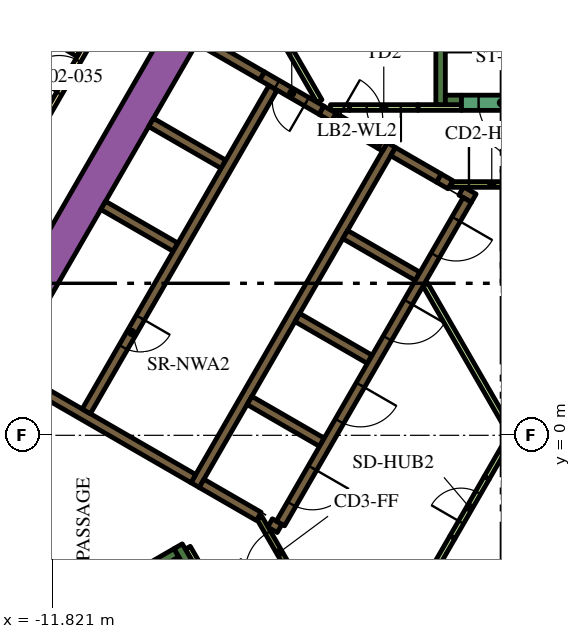
"""IFC4 building model, lengths in metres.
Left out: names, types, materials, properties, quantities, classifications, styles, units other than length and angle.
Written with IfcOpenShell. Run it as: python <this file> out.ifc"""

import sys

from ifc_helpers import new_model, si_unit, direction, frame, frame_2d, origin, place, context, subcontext, project, spatial, polyline, rectangle, outline, extrude, element, fill, save


model = new_model("IFC4")
c1 = context("Model", 3, precision=1e-05, world=origin(), true_north=direction((0.0, 1.0)))
c2 = subcontext(c1, "Body", "Model", "MODEL_VIEW")
j1 = project(units=[si_unit("LENGTHUNIT", "METRE"), si_unit("PLANEANGLEUNIT", "RADIAN")], contexts=[c1])
p1 = place(None, origin())
s1 = spatial("IfcSite", under=j1, at=p1, CompositionType="ELEMENT")
p2 = place(p1, origin())
s2 = spatial("IfcBuilding", under=s1, at=p2, CompositionType="ELEMENT")
p3 = place(p2, frame((0.0, 0.0, 47.1)))
s3 = spatial("IfcBuildingStorey", under=s2, at=p3, CompositionType="ELEMENT", Elevation=47.1)
p4 = place(p3, frame((-15.36, -1.503, 0.0), z_axis=(0.0, 0.0, 1.0), x_axis=(0.50000389221, 0.866023156604, 0.0)))
e1 = element("IfcWall", 1, at=p4, inside=s3, PredefinedType="SOLIDWALL", context=c2, shape_type="SweptSolid", body=[
    extrude(rectangle(XDim=21.0, YDim=0.9, at=frame_2d((10.5, 0.0))), origin(), (0.0, 0.0, 1.0), 3.9),
])
p5 = place(p3, frame((-1.6, 8.7, 0.0), z_axis=(0.0, 0.0, 1.0), x_axis=(0.0, 1.0, 0.0)))
e2 = element("IfcWall", 2, at=p5, inside=s3, PredefinedType="SOLIDWALL", context=c2, shape_type="SweptSolid", body=[
    extrude(rectangle(XDim=7.05, YDim=0.25, at=frame_2d((3.525, 0.0))), origin(), (0.0, 0.0, 1.0), 3.9),
])
p6 = place(p3, frame((-1.475, 8.825, 0.0), z_axis=(0.0, 0.0, 1.0), x_axis=(1.0, 0.0, 0.0)))
e3 = element("IfcWall", 3, at=p6, inside=s3, PredefinedType="SOLIDWALL", context=c2, shape_type="SweptSolid", body=[
    extrude(rectangle(XDim=0.425, YDim=0.25, at=frame_2d((0.212, 0.0))), origin(), (0.0, 0.0, 1.0), 3.9),
])
p7 = place(p3, frame((-14.44, -6.49, 0.0), z_axis=(0.0, 0.0, 1.0), x_axis=(0.866022966069, 0.500004222222, 0.0)))
e4 = element("IfcWall", 4, at=p7, inside=s3, PredefinedType="SOLIDWALL", context=c2, shape_type="SweptSolid", body=[
    extrude(rectangle(XDim=6.8, YDim=0.25, at=frame_2d((3.4, 0.0))), origin(), (0.0, 0.0, 1.0), 3.9),
])
p8 = place(p3, frame((-8.168, -3.503, 0.0), z_axis=(0.0, 0.0, 1.0), x_axis=(-0.499952099219, 0.866053057547, 0.0)))
e5 = element("IfcWall", 5, at=p8, inside=s3, PredefinedType="SOLIDWALL", context=c2, shape_type="SweptSolid", body=[
    extrude(rectangle(XDim=0.675, YDim=0.25, at=frame_2d((0.337, 0.0))), origin(), (0.0, 0.0, 1.0), 3.9),
])
p9 = place(p3, frame((-8.06, -1.311, 0.0), z_axis=(0.0, 0.0, 1.0), x_axis=(0.50000273126, 0.866023826885, 0.0)))
e6 = element("IfcWall", 6, at=p9, inside=s3, PredefinedType="SOLIDWALL", context=c2, shape_type="SweptSolid", body=[
    extrude(rectangle(XDim=10.33, YDim=0.25, at=frame_2d((5.165, 0.0))), origin(), (0.0, 0.0, 1.0), 3.9),
])
p10 = place(p3, frame((-1.342, 6.595, 0.0), z_axis=(0.0, 0.0, 1.0), x_axis=(-0.866046247233, 0.49996389635, 0.0)))
e7 = element("IfcWall", 7, at=p10, inside=s3, PredefinedType="SOLIDWALL", context=c2, shape_type="SweptSolid", body=[
    extrude(rectangle(XDim=0.35, YDim=0.25, at=frame_2d((0.175, 0.0))), origin(), (0.0, 0.0, 1.0), 3.9),
])
p11 = place(p3, frame((-1.647, 6.771, 0.0), z_axis=(0.0, 0.0, 1.0), x_axis=(-0.865971728693, 0.500092956464, 0.0)))
e8 = element("IfcWall", 8, at=p11, inside=s3, PredefinedType="SOLIDWALL", context=c2, shape_type="SweptSolid", body=[
    extrude(rectangle(XDim=1.388, YDim=0.25, at=frame_2d((0.694, 0.0))), origin(), (0.0, 0.0, 1.0), 3.9),
])
p12 = place(p3, frame((-0.728, 6.24, 0.0), z_axis=(0.0, 0.0, 1.0), x_axis=(-0.866088799389, 0.499890179513, 0.0)))
e9 = element("IfcWall", 9, at=p12, inside=s3, PredefinedType="SOLIDWALL", context=c2, shape_type="SweptSolid", body=[
    extrude(rectangle(XDim=0.378, YDim=0.25, at=frame_2d((0.189, 0.0))), origin(), (0.0, 0.0, 1.0), 3.9),
])
for number, where, z_axis, x_axis in (
    (10, (-2.204, 4.182, 0.0), (0.0, 0.0, 1.0), (-0.866, 0.5, 0.0)),
    (11, (-5.369, 3.1, 0.0), (0.0, 0.0, 1.0), (0.866, -0.5, 0.0)),
    (12, (-4.724, -0.182, 0.0), (0.0, 0.0, 1.0), (-0.866, 0.5, 0.0)),
):
    element("IfcWall", number, at=place(p3, frame(where, z_axis=z_axis, x_axis=x_axis)), inside=s3, PredefinedType="SOLIDWALL", context=c2, shape_type="SweptSolid", body=[
        extrude(rectangle(XDim=2.2, YDim=0.25, at=frame_2d((1.1, 0.0))), origin(), (0.0, 0.0, 1.0), 3.9),
    ])
p13 = place(p3, frame((-6.088, -2.305, 0.0), z_axis=(0.0, 0.0, 1.0), x_axis=(0.866059450854, -0.499941024108, 0.0)))
e13 = element("IfcWall", 13, at=p13, inside=s3, PredefinedType="SOLIDWALL", context=c2, shape_type="SweptSolid", body=[
    extrude(rectangle(XDim=0.29, YDim=0.25, at=frame_2d((0.145, 0.0))), origin(), (0.0, 0.0, 1.0), 3.9),
])
p14 = place(p3, frame((-7.889, -1.265, 0.0), z_axis=(0.0, 0.0, 1.0), x_axis=(0.865986741702, -0.500066958712, 0.0)))
e14 = element("IfcWall", 14, at=p14, inside=s3, PredefinedType="SOLIDWALL", context=c2, shape_type="SweptSolid", body=[
    extrude(rectangle(XDim=1.738, YDim=0.25, at=frame_2d((0.869, 0.0))), origin(), (0.0, 0.0, 1.0), 3.9),
])
p15 = place(p3, frame((-8.106, -1.14, 0.0), z_axis=(0.0, 0.0, 1.0), x_axis=(-0.866000643155, 0.500042884217, 0.0)))
e15 = element("IfcWall", 15, at=p15, inside=s3, PredefinedType="SOLIDWALL", context=c2, shape_type="SweptSolid", body=[
    extrude(rectangle(XDim=5.65, YDim=0.25, at=frame_2d((2.825, 0.0))), origin(), (0.0, 0.0, 1.0), 3.9),
])
p16 = place(p3, origin())
e16 = element("IfcWall", 16, at=p16, inside=s3, PredefinedType="SOLIDWALL", context=c2, shape_type="SweptSolid", body=[
    extrude(outline(polyline([(-3.128, 7.481), (-3.259, 7.557), (-3.134, 7.773), (-3.003, 7.698), (-3.128, 7.481)])), origin(), (0.0, 0.0, 1.0), 3.9),
])
for number, where, z_axis, x_axis in (
    (17, (-8.574, 4.95, 0.0), (0.0, 0.0, 1.0), (-0.866, 0.5, 0.0)),
    (18, (-7.314, 7.132, 0.0), (0.0, 0.0, 1.0), (-0.866, 0.5, 0.0)),
):
    element("IfcWall", number, at=place(p3, frame(where, z_axis=z_axis, x_axis=x_axis)), inside=s3, PredefinedType="SOLIDWALL", context=c2, shape_type="SweptSolid", body=[
        extrude(rectangle(XDim=2.2, YDim=0.25, at=frame_2d((1.1, 0.0))), origin(), (0.0, 0.0, 1.0), 3.9),
    ])
p17 = place(p3, frame((-6.296, 9.455, 0.0), z_axis=(0.0, 0.0, 1.0), x_axis=(-0.866011930837, 0.500023335103, 0.0)))
e19 = element("IfcWall", 19, at=p17, inside=s3, PredefinedType="SOLIDWALL", context=c2, shape_type="SweptSolid", body=[
    extrude(rectangle(XDim=1.92, YDim=0.25, at=frame_2d((0.96, 0.0))), origin(), (0.0, 0.0, 1.0), 3.9),
])
p18 = place(p3, frame((-4.409, 8.365, 0.0), z_axis=(0.0, 0.0, 1.0), x_axis=(-0.866057014183, 0.499945245186, 0.0)))
e20 = element("IfcWall", 20, at=p18, inside=s3, PredefinedType="SOLIDWALL", context=c2, shape_type="SweptSolid", body=[
    extrude(rectangle(XDim=0.379, YDim=0.25, at=frame_2d((0.19, 0.0))), origin(), (0.0, 0.0, 1.0), 3.9),
])
p19 = place(p3, frame((-1.887, -3.718, 0.0), z_axis=(0.0, 0.0, 1.0), x_axis=(0.500057179532, 0.865992388649, 0.0)))
e21 = element("IfcWall", 21, at=p19, inside=s3, PredefinedType="PARTITIONING", context=c2, shape_type="SweptSolid", body=[
    extrude(rectangle(XDim=1.199, YDim=0.15, at=frame_2d((0.6, 0.0))), origin(), (0.0, 0.0, 1.0), 2.75),
])
p20 = place(p3, frame((-8.252, -2.958, 0.0), z_axis=(0.0, 0.0, 1.0), x_axis=(0.500174715838, -0.865924508047, 0.0)))
e22 = element("IfcWall", 22, at=p20, inside=s3, PredefinedType="PARTITIONING", context=c2, shape_type="SweptSolid", body=[
    extrude(rectangle(XDim=0.514, YDim=0.15, at=frame_2d((0.257, 0.0))), origin(), (0.0, 0.0, 1.0), 2.75),
])
p21 = place(p3, frame((-2.195, 8.625, 0.0), z_axis=(0.0, 0.0, 1.0), x_axis=(1.0, 0.0, 0.0)))
e23 = element("IfcWall", 23, at=p21, inside=s3, PredefinedType="PARTITIONING", context=c2, shape_type="SweptSolid", body=[
    extrude(rectangle(XDim=1.145, YDim=0.15, at=frame_2d((0.573, 0.0))), origin(), (0.0, 0.0, 1.0), 2.75),
])
p22 = place(p3, frame((-6.823, 12.318, 0.0), z_axis=(0.0, 0.0, 1.0), x_axis=(0.500007885066, -0.866020851292, 0.0)))
e24 = element("IfcWall", 24, at=p22, inside=s3, PredefinedType="PARTITIONING", context=c2, shape_type="SweptSolid", body=[
    extrude(rectangle(XDim=4.072, YDim=0.15, at=frame_2d((2.036, 0.0))), origin(), (0.0, 0.0, 1.0), 2.75),
])
p23 = place(p3, frame((-4.498, 8.625, 0.0), z_axis=(0.0, 0.0, 1.0), x_axis=(1.0, 0.0, 0.0)))
e25 = element("IfcWall", 25, at=p23, inside=s3, PredefinedType="PARTITIONING", context=c2, shape_type="SweptSolid", body=[
    extrude(rectangle(XDim=0.502, YDim=0.15, at=frame_2d((0.251, 0.0))), origin(), (0.0, 0.0, 1.0), 2.75),
])
p24 = place(p3, frame((2.435, -3.718, 0.0), z_axis=(0.0, 0.0, 1.0), x_axis=(-0.499985176046, 0.866033962229, 0.0)))
e26 = element("IfcWall", 26, at=p24, inside=s3, PredefinedType="PARTITIONING", context=c2, shape_type="SweptSolid", body=[
    extrude(rectangle(XDim=8.875, YDim=0.15, at=frame_2d((4.438, 0.0))), origin(), (0.0, 0.0, 1.0), 2.75),
])
p25 = place(p3, frame((-0.387, -1.121, 0.0), z_axis=(0.0, 0.0, 1.0), x_axis=(0.500057179532, 0.865992388649, 0.0)))
e27 = element("IfcWall", 27, at=p25, inside=s3, PredefinedType="PARTITIONING", context=c2, shape_type="SweptSolid", body=[
    extrude(rectangle(XDim=1.199, YDim=0.15, at=frame_2d((0.6, 0.0))), origin(), (0.0, 0.0, 1.0), 2.75),
])
p26 = place(p3, frame((-6.008, 9.144, 0.0), z_axis=(0.0, 0.0, 1.0), x_axis=(-0.500006956611, -0.866021387346, 0.0)))
e28 = element("IfcWall", 28, at=p26, inside=s3, PredefinedType="SOLIDWALL", context=c2, shape_type="SweptSolid", body=[
    extrude(rectangle(XDim=9.83, YDim=0.25, at=frame_2d((4.915, 0.0))), origin(), (0.0, 0.0, 1.0), 3.9),
])
p27 = place(p26, frame((6.985, 0.0, 0.0)))
e29 = element("IfcOpeningElement", 29, at=p27, cuts=e28, PredefinedType="OPENING", context=c2, shape_type="SweptSolid", body=[
    extrude(rectangle(XDim=0.9, YDim=2.1, at=frame_2d((0.45, 1.05))), frame((0.0, 0.135, 0.0), z_axis=(0.0, -1.0, 0.0), x_axis=(1.0, 0.0, 0.0)), (0.0, 0.0, 1.0), 0.27),
])
p28 = place(p3, frame((-0.898, 6.194, 0.0), z_axis=(0.0, 0.0, 1.0), x_axis=(-0.499996202215, -0.866027596426, 0.0)))
e30 = element("IfcWall", 30, at=p28, inside=s3, PredefinedType="SOLIDWALL", context=c2, shape_type="SweptSolid", body=[
    extrude(rectangle(XDim=9.83, YDim=0.25, at=frame_2d((4.915, 0.0))), origin(), (0.0, 0.0, 1.0), 3.9),
])
p29 = place(p28, frame((0.585, 0.0, 0.0)))
e31 = element("IfcOpeningElement", 31, at=p29, cuts=e30, PredefinedType="OPENING", context=c2, shape_type="SweptSolid", body=[
    extrude(rectangle(XDim=1.1, YDim=2.1, at=frame_2d((0.55, 1.05))), frame((0.0, 0.135, 0.0), z_axis=(0.0, -1.0, 0.0), x_axis=(1.0, 0.0, 0.0)), (0.0, 0.0, 1.0), 0.27),
])
p30 = place(p28, frame((3.105, 0.0, 0.0)))
e32 = element("IfcOpeningElement", 32, at=p30, cuts=e30, PredefinedType="OPENING", context=c2, shape_type="SweptSolid", body=[
    extrude(rectangle(XDim=1.1, YDim=2.1, at=frame_2d((0.55, 1.05))), frame((0.0, 0.135, 0.0), z_axis=(0.0, -1.0, 0.0), x_axis=(1.0, 0.0, 0.0)), (0.0, 0.0, 1.0), 0.27),
])
p31 = place(p28, frame((5.625, 0.0, 0.0)))
e33 = element("IfcOpeningElement", 33, at=p31, cuts=e30, PredefinedType="OPENING", context=c2, shape_type="SweptSolid", body=[
    extrude(rectangle(XDim=1.1, YDim=2.1, at=frame_2d((0.55, 1.05))), frame((0.0, 0.135, 0.0), z_axis=(0.0, -1.0, 0.0), x_axis=(1.0, 0.0, 0.0)), (0.0, 0.0, 1.0), 0.27),
])
p32 = place(p28, frame((8.145, 0.0, 0.0)))
e34 = element("IfcOpeningElement", 34, at=p32, cuts=e30, PredefinedType="OPENING", context=c2, shape_type="SweptSolid", body=[
    extrude(rectangle(XDim=1.1, YDim=2.1, at=frame_2d((0.55, 1.05))), frame((0.0, 0.135, 0.0), z_axis=(0.0, -1.0, 0.0), x_axis=(1.0, 0.0, 0.0)), (0.0, 0.0, 1.0), 0.27),
])
p33 = place(p3, frame((1.05, 8.75, 0.0), z_axis=(0.0, 0.0, 1.0), x_axis=(-1.0, 0.0, 0.0)))
e35 = element("IfcWall", 35, at=p33, inside=s3, PredefinedType="SOLIDWALL", context=c2, shape_type="SweptSolid", body=[
    extrude(rectangle(XDim=2.1, YDim=0.4, at=frame_2d((1.05, 0.0))), origin(), (0.0, 0.0, 1.0), 3.9),
])
p34 = place(p33, frame((0.45, 0.0, 0.0)))
e36 = element("IfcOpeningElement", 36, at=p34, cuts=e35, PredefinedType="OPENING", context=c2, shape_type="SweptSolid", body=[
    extrude(rectangle(XDim=1.2, YDim=2.1, at=frame_2d((0.6, 1.05))), frame((0.0, 0.21, 0.0), z_axis=(0.0, -1.0, 0.0), x_axis=(1.0, 0.0, 0.0)), (0.0, 0.0, 1.0), 0.42),
])
p35 = place(p3, frame((-2.195, 8.625, 0.0), z_axis=(0.0, 0.0, 1.0), x_axis=(-1.0, 0.0, 0.0)))
e37 = element("IfcWall", 37, at=p35, inside=s3, PredefinedType="PARTITIONING", context=c2, shape_type="SweptSolid", body=[
    extrude(rectangle(XDim=1.8, YDim=0.15, at=frame_2d((0.9, 0.0))), origin(), (0.0, 0.0, 1.0), 2.75),
])
p36 = place(p35, frame((0.45, 0.0, 0.0)))
e38 = element("IfcOpeningElement", 38, at=p36, cuts=e37, PredefinedType="OPENING", context=c2, shape_type="SweptSolid", body=[
    extrude(rectangle(XDim=0.9, YDim=2.1, at=frame_2d((0.45, 1.05))), frame((0.0, 0.085, 0.0), z_axis=(0.0, -1.0, 0.0), x_axis=(1.0, 0.0, 0.0)), (0.0, 0.0, 1.0), 0.17),
])
p37 = place(p3, frame((-1.303, 6.6, 0.0), z_axis=(0.0, 0.0, 1.0), x_axis=(1.0, 0.0, 0.0)))
e39 = element("IfcWall", 39, at=p37, inside=s3, PredefinedType="PARTITIONING", context=c2, shape_type="SweptSolid", body=[
    extrude(rectangle(XDim=2.1, YDim=0.15, at=frame_2d((1.05, 0.0))), origin(), (0.0, 0.0, 1.0), 3.9),
])
p38 = place(p37, frame((0.45, 0.0, 0.0)))
e40 = element("IfcOpeningElement", 40, at=p38, cuts=e39, PredefinedType="OPENING", context=c2, shape_type="SweptSolid", body=[
    extrude(rectangle(XDim=1.2, YDim=2.1, at=frame_2d((0.6, 1.05))), frame((0.0, 0.085, 0.0), z_axis=(0.0, -1.0, 0.0), x_axis=(1.0, 0.0, 0.0)), (0.0, 0.0, 1.0), 0.17),
])
p39 = place(p3, frame((-5.317, -3.99, 0.0), z_axis=(0.0, 0.0, 1.0), x_axis=(-0.500027713859, 0.866009402589, 0.0)))
e41 = element("IfcWall", 41, at=p39, inside=s3, PredefinedType="PARTITIONING", context=c2, shape_type="SweptSolid", body=[
    extrude(rectangle(XDim=2.1, YDim=0.15, at=frame_2d((1.05, 0.0))), origin(), (0.0, 0.0, 1.0), 3.9),
])
p40 = place(p39, frame((0.45, 0.0, 0.0)))
e42 = element("IfcOpeningElement", 42, at=p40, cuts=e41, PredefinedType="OPENING", context=c2, shape_type="SweptSolid", body=[
    extrude(rectangle(XDim=1.2, YDim=2.1, at=frame_2d((0.6, 1.05))), frame((0.0, 0.085, 0.0), z_axis=(0.0, -1.0, 0.0), x_axis=(1.0, 0.0, 0.0)), (0.0, 0.0, 1.0), 0.17),
])
p41 = place(p3, frame((-4.409, 8.365, 0.0), z_axis=(0.0, 0.0, 1.0), x_axis=(0.866034573852, -0.49998411664, 0.0)))
e43 = element("IfcWall", 43, at=p41, inside=s3, PredefinedType="SOLIDWALL", context=c2, shape_type="SweptSolid", body=[
    extrude(rectangle(XDim=1.4, YDim=0.25, at=frame_2d((0.7, 0.0))), origin(), (0.0, 0.0, 1.0), 3.9),
])
p42 = place(p41, frame((0.1, 0.0, 0.0)))
e44 = element("IfcOpeningElement", 44, at=p42, cuts=e43, PredefinedType="OPENING", context=c2, shape_type="SweptSolid", body=[
    extrude(rectangle(XDim=1.2, YDim=2.1, at=frame_2d((0.6, 1.05))), frame((0.0, 0.135, 0.0), z_axis=(0.0, -1.0, 0.0), x_axis=(1.0, 0.0, 0.0)), (0.0, 0.0, 1.0), 0.27),
])
p43 = place(p3, frame((-1.287, -2.679, 0.0), z_axis=(0.0, 0.0, 1.0), x_axis=(0.499961193289, 0.866047807691, 0.0)))
e45 = element("IfcWall", 45, at=p43, inside=s3, PredefinedType="PARTITIONING", context=c2, shape_type="SweptSolid", body=[
    extrude(rectangle(XDim=1.8, YDim=0.15, at=frame_2d((0.9, 0.0))), origin(), (0.0, 0.0, 1.0), 2.75),
])
p44 = place(p43, frame((0.45, 0.0, 0.0)))
e46 = element("IfcOpeningElement", 46, at=p44, cuts=e45, PredefinedType="OPENING", context=c2, shape_type="SweptSolid", body=[
    extrude(rectangle(XDim=0.9, YDim=2.1, at=frame_2d((0.45, 1.05))), frame((0.0, 0.085, 0.0), z_axis=(0.0, -1.0, 0.0), x_axis=(1.0, 0.0, 0.0)), (0.0, 0.0, 1.0), 0.17),
])
p45 = place(p3, frame((-4.737, 8.555, 0.0), z_axis=(0.0, 0.0, 1.0), x_axis=(-0.865989075817, 0.500062916607, 0.0)))
e47 = element("IfcWall", 47, at=p45, inside=s3, PredefinedType="SOLIDWALL", context=c2, shape_type="SweptSolid", body=[
    extrude(rectangle(XDim=1.8, YDim=0.25, at=frame_2d((0.9, 0.0))), origin(), (0.0, 0.0, 1.0), 3.9),
])
p46 = place(p45, frame((0.45, 0.0, 0.0)))
e48 = element("IfcOpeningElement", 48, at=p46, cuts=e47, PredefinedType="OPENING", context=c2, shape_type="SweptSolid", body=[
    extrude(rectangle(XDim=0.9, YDim=2.1, at=frame_2d((0.45, 1.05))), frame((0.0, 0.135, 0.0), z_axis=(0.0, -1.0, 0.0), x_axis=(1.0, 0.0, 0.0)), (0.0, 0.0, 1.0), 0.27),
])
p47 = place(p3, frame((-19.081, -3.9, 0.0), z_axis=(0.0, 0.0, 1.0), x_axis=(0.499998313975, 0.866026377209, 0.0)))
e49 = element("IfcWall", 49, at=p47, inside=s3, PredefinedType="PARTITIONING", context=c2, shape_type="SweptSolid", body=[
    extrude(rectangle(XDim=25.766, YDim=0.15, at=frame_2d((12.883, 0.0))), origin(), (0.0, 0.0, 1.0), 2.75),
])
p48 = place(p47, frame((16.196, 0.0, 0.0)))
e50 = element("IfcOpeningElement", 50, at=p48, cuts=e49, PredefinedType="OPENING", context=c2, shape_type="SweptSolid", body=[
    extrude(rectangle(XDim=1.0, YDim=2.1, at=frame_2d((0.5, 1.05))), frame((0.0, 0.085, 0.0), z_axis=(0.0, -1.0, 0.0), x_axis=(1.0, 0.0, 0.0)), (0.0, 0.0, 1.0), 0.17),
])
p49 = place(p47, frame((14.889, 0.0, 0.0)))
e51 = element("IfcOpeningElement", 51, at=p49, cuts=e49, PredefinedType="OPENING", context=c2, shape_type="SweptSolid", body=[
    extrude(rectangle(XDim=1.0, YDim=2.1, at=frame_2d((0.5, 1.05))), frame((0.0, 0.085, 0.0), z_axis=(0.0, -1.0, 0.0), x_axis=(1.0, 0.0, 0.0)), (0.0, 0.0, 1.0), 0.17),
])
p50 = place(p47, frame((3.698, 0.0, 0.0)))
e52 = element("IfcOpeningElement", 52, at=p50, cuts=e49, PredefinedType="OPENING", context=c2, shape_type="SweptSolid", body=[
    extrude(rectangle(XDim=1.1, YDim=2.1, at=frame_2d((0.55, 1.05))), frame((0.0, 0.085, 0.0), z_axis=(0.0, -1.0, 0.0), x_axis=(1.0, 0.0, 0.0)), (0.0, 0.0, 1.0), 0.17),
])
p51 = place(p47, frame((2.392, 0.0, 0.0)))
e53 = element("IfcOpeningElement", 53, at=p51, cuts=e49, PredefinedType="OPENING", context=c2, shape_type="SweptSolid", body=[
    extrude(rectangle(XDim=1.0, YDim=2.1, at=frame_2d((0.5, 1.05))), frame((0.0, 0.085, 0.0), z_axis=(0.0, -1.0, 0.0), x_axis=(1.0, 0.0, 0.0)), (0.0, 0.0, 1.0), 0.17),
])
p52 = place(p3, frame((-17.856, 13.999, 0.0), z_axis=(0.0, 0.0, 1.0), x_axis=(0.861371519381, -0.507975497047, 0.0)))
e54 = element("IfcWall", 54, at=p52, inside=s3, PredefinedType="PARTITIONING", context=c2, shape_type="SweptSolid", body=[
    extrude(rectangle(XDim=7.804, YDim=0.15, at=frame_2d((3.902, 0.0))), origin(), (0.0, 0.0, 1.0), 2.75),
])
p53 = place(p27, origin())
e55 = element("IfcDoor", 55, at=p53, inside=s3, OperationType="SINGLE_SWING_LEFT", PredefinedType="DOOR", context=c2, shape_type="SweptSolid", body=[
    extrude(rectangle(XDim=0.9, YDim=2.1, at=frame_2d((0.45, 1.05))), frame((0.0, 0.025, 0.0), z_axis=(0.0, -1.0, 0.0), x_axis=(1.0, 0.0, 0.0)), (0.0, 0.0, 1.0), 0.05),
])
fill(e29, e55)
p54 = place(p29, origin())
e56 = element("IfcDoor", 56, at=p54, inside=s3, OperationType="DOUBLE_DOOR_SLIDING", PredefinedType="DOOR", context=c2, shape_type="SweptSolid", body=[
    extrude(rectangle(XDim=1.1, YDim=2.1, at=frame_2d((0.55, 1.05))), frame((0.0, 0.025, 0.0), z_axis=(0.0, -1.0, 0.0), x_axis=(1.0, 0.0, 0.0)), (0.0, 0.0, 1.0), 0.05),
])
fill(e31, e56)
p55 = place(p30, origin())
e57 = element("IfcDoor", 57, at=p55, inside=s3, OperationType="DOUBLE_DOOR_SLIDING", PredefinedType="DOOR", context=c2, shape_type="SweptSolid", body=[
    extrude(rectangle(XDim=1.1, YDim=2.1, at=frame_2d((0.55, 1.05))), frame((0.0, 0.025, 0.0), z_axis=(0.0, -1.0, 0.0), x_axis=(1.0, 0.0, 0.0)), (0.0, 0.0, 1.0), 0.05),
])
fill(e32, e57)
p56 = place(p31, origin())
e58 = element("IfcDoor", 58, at=p56, inside=s3, OperationType="DOUBLE_DOOR_SLIDING", PredefinedType="DOOR", context=c2, shape_type="SweptSolid", body=[
    extrude(rectangle(XDim=1.1, YDim=2.1, at=frame_2d((0.55, 1.05))), frame((0.0, 0.025, 0.0), z_axis=(0.0, -1.0, 0.0), x_axis=(1.0, 0.0, 0.0)), (0.0, 0.0, 1.0), 0.05),
])
fill(e33, e58)
p57 = place(p32, origin())
e59 = element("IfcDoor", 59, at=p57, inside=s3, OperationType="DOUBLE_DOOR_SLIDING", PredefinedType="DOOR", context=c2, shape_type="SweptSolid", body=[
    extrude(rectangle(XDim=1.1, YDim=2.1, at=frame_2d((0.55, 1.05))), frame((0.0, 0.025, 0.0), z_axis=(0.0, -1.0, 0.0), x_axis=(1.0, 0.0, 0.0)), (0.0, 0.0, 1.0), 0.05),
])
fill(e34, e59)
p58 = place(p34, origin())
e60 = element("IfcDoor", 60, at=p58, inside=s3, OperationType="SINGLE_SWING_LEFT", PredefinedType="DOOR", context=c2, shape_type="SweptSolid", body=[
    extrude(rectangle(XDim=1.2, YDim=2.1, at=frame_2d((0.6, 1.05))), frame((0.0, 0.025, 0.0), z_axis=(0.0, -1.0, 0.0), x_axis=(1.0, 0.0, 0.0)), (0.0, 0.0, 1.0), 0.05),
])
fill(e36, e60)
p59 = place(p36, origin())
e61 = element("IfcDoor", 61, at=p59, inside=s3, OperationType="SINGLE_SWING_LEFT", PredefinedType="DOOR", context=c2, shape_type="SweptSolid", body=[
    extrude(rectangle(XDim=0.9, YDim=2.1, at=frame_2d((0.45, 1.05))), frame((0.0, 0.025, 0.0), z_axis=(0.0, -1.0, 0.0), x_axis=(1.0, 0.0, 0.0)), (0.0, 0.0, 1.0), 0.05),
])
fill(e38, e61)
p60 = place(p38, origin())
e62 = element("IfcDoor", 62, at=p60, inside=s3, OperationType="SINGLE_SWING_LEFT", PredefinedType="DOOR", context=c2, shape_type="SweptSolid", body=[
    extrude(rectangle(XDim=1.2, YDim=2.1, at=frame_2d((0.6, 1.05))), frame((0.0, 0.025, 0.0), z_axis=(0.0, -1.0, 0.0), x_axis=(1.0, 0.0, 0.0)), (0.0, 0.0, 1.0), 0.05),
])
fill(e40, e62)
p61 = place(p40, origin())
e63 = element("IfcDoor", 63, at=p61, inside=s3, OperationType="SINGLE_SWING_LEFT", PredefinedType="DOOR", context=c2, shape_type="SweptSolid", body=[
    extrude(rectangle(XDim=1.2, YDim=2.1, at=frame_2d((0.6, 1.05))), frame((0.0, 0.025, 0.0), z_axis=(0.0, -1.0, 0.0), x_axis=(1.0, 0.0, 0.0)), (0.0, 0.0, 1.0), 0.05),
])
fill(e42, e63)
p62 = place(p42, origin())
e64 = element("IfcDoor", 64, at=p62, inside=s3, OperationType="SINGLE_SWING_LEFT", PredefinedType="DOOR", context=c2, shape_type="SweptSolid", body=[
    extrude(rectangle(XDim=1.2, YDim=2.1, at=frame_2d((0.6, 1.05))), frame((0.0, 0.025, 0.0), z_axis=(0.0, -1.0, 0.0), x_axis=(1.0, 0.0, 0.0)), (0.0, 0.0, 1.0), 0.05),
])
fill(e44, e64)
p63 = place(p44, origin())
e65 = element("IfcDoor", 65, at=p63, inside=s3, OperationType="SINGLE_SWING_LEFT", PredefinedType="DOOR", context=c2, shape_type="SweptSolid", body=[
    extrude(rectangle(XDim=0.9, YDim=2.1, at=frame_2d((0.45, 1.05))), frame((0.0, 0.025, 0.0), z_axis=(0.0, -1.0, 0.0), x_axis=(1.0, 0.0, 0.0)), (0.0, 0.0, 1.0), 0.05),
])
fill(e46, e65)
p64 = place(p46, origin())
e66 = element("IfcDoor", 66, at=p64, inside=s3, OperationType="SINGLE_SWING_LEFT", PredefinedType="DOOR", context=c2, shape_type="SweptSolid", body=[
    extrude(rectangle(XDim=0.9, YDim=2.1, at=frame_2d((0.45, 1.05))), frame((0.0, 0.025, 0.0), z_axis=(0.0, -1.0, 0.0), x_axis=(1.0, 0.0, 0.0)), (0.0, 0.0, 1.0), 0.05),
])
fill(e48, e66)
p65 = place(p49, origin())
e67 = element("IfcDoor", 67, at=p65, inside=s3, OperationType="SINGLE_SWING_RIGHT", PredefinedType="DOOR", context=c2, shape_type="SweptSolid", body=[
    extrude(rectangle(XDim=1.0, YDim=2.1, at=frame_2d((0.5, 1.05))), frame((0.0, 0.025, 0.0), z_axis=(0.0, -1.0, 0.0), x_axis=(1.0, 0.0, 0.0)), (0.0, 0.0, 1.0), 0.05),
])
fill(e51, e67)
save(model, sys.argv[1])
